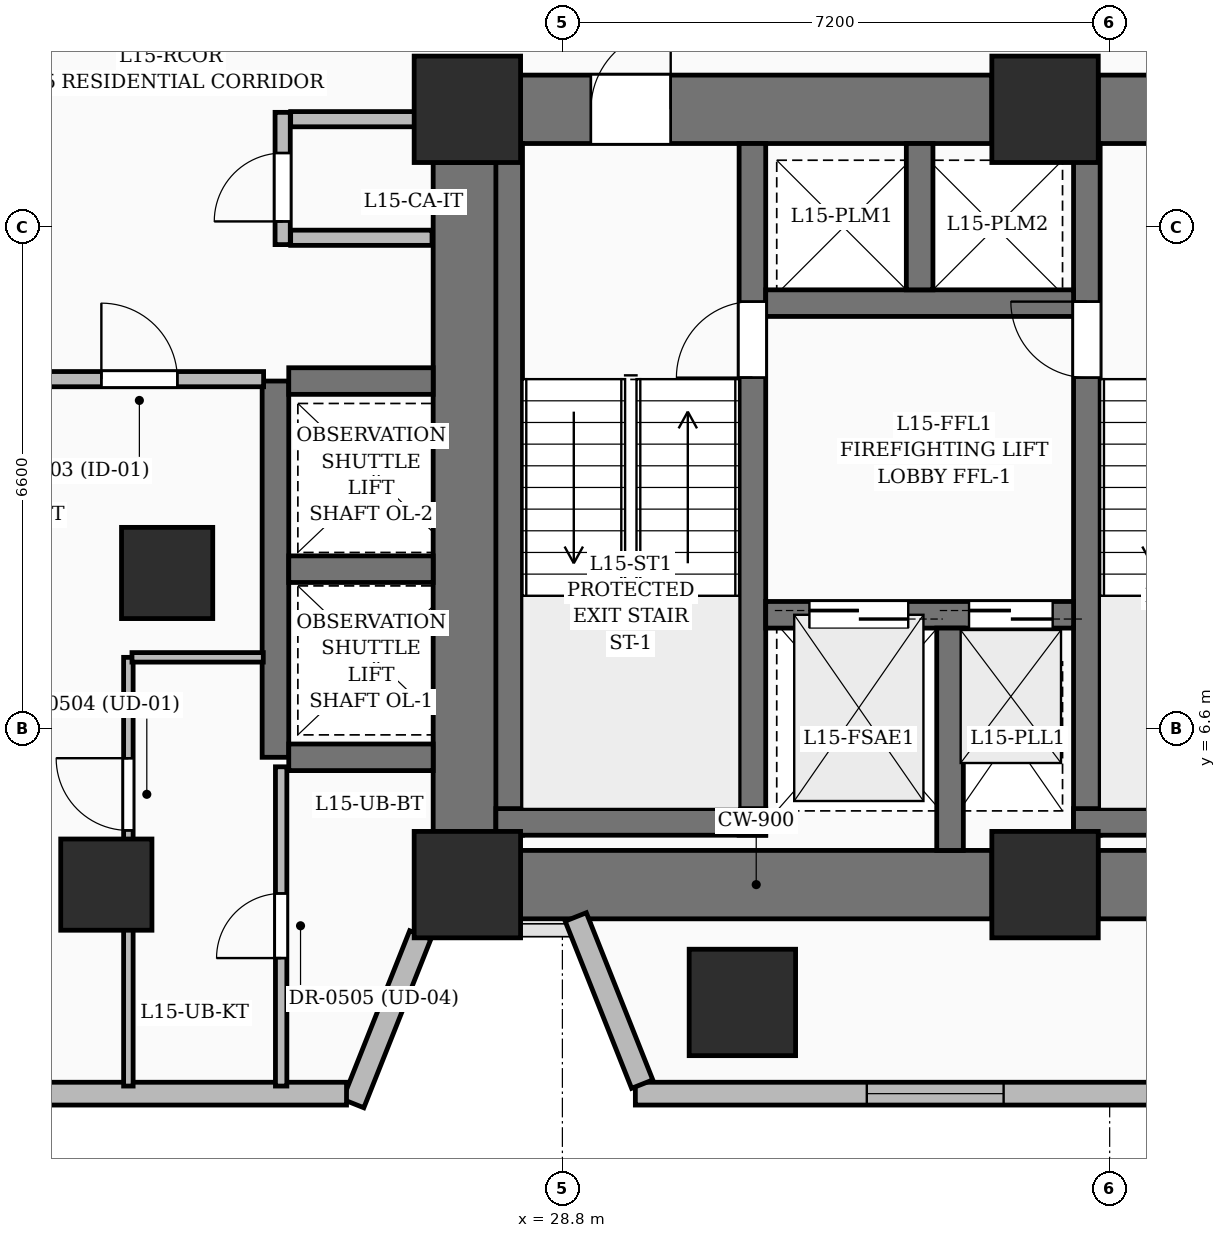
"""IFC4 building model, lengths in metres.
Left out: names, types, materials, properties, quantities, classifications, styles, units other than length and angle.
Written with IfcOpenShell. Run it as: python <this file> out.ifc"""

import sys

from ifc_helpers import new_model, si_unit, direction, frame, frame_2d, origin, origin_2d, place, context, subcontext, project, spatial, rectangle, extrude, element, fill, save


model = new_model("IFC4")
c1 = context("Model", 3, precision=1e-05, world=origin(), true_north=direction((0.0, 1.0)))
c2 = subcontext(c1, "Body", "Model", "MODEL_VIEW")
j1 = project(units=[si_unit("LENGTHUNIT", "METRE"), si_unit("PLANEANGLEUNIT", "RADIAN")], contexts=[c1])
p1 = place(None, origin())
s1 = spatial("IfcSite", under=j1, at=p1, CompositionType="ELEMENT")
p2 = place(p1, origin())
s2 = spatial("IfcBuilding", under=s1, at=p2, CompositionType="ELEMENT")
p3 = place(p2, frame((0.0, 0.0, 64.2)))
s3 = spatial("IfcBuildingStorey", under=s2, at=p3, CompositionType="ELEMENT", Elevation=64.2)
for number, where, z_axis, x_axis in (
    (1, (27.55, 4.55, 0.0), (0.0, 0.0, 1.0), (1.0, 0.0, 0.0)),
    (2, (35.15, 4.55, 0.0), (0.0, 0.0, 1.0), (1.0, 0.0, 0.0)),
    (3, (27.55, 14.75, 0.0), (0.0, 0.0, 1.0), (1.0, 0.0, 0.0)),
    (4, (35.15, 14.75, 0.0), (0.0, 0.0, 1.0), (1.0, 0.0, 0.0)),
):
    element("IfcColumn", number, at=place(p3, frame(where, z_axis=z_axis, x_axis=x_axis)), inside=s3, PredefinedType="COLUMN", context=c2, shape_type="SweptSolid", body=[
        extrude(rectangle(XDim=1.4, YDim=1.4, at=origin_2d()), origin(), (0.0, 0.0, 1.0), 3.6),
    ])
for number, where, z_axis, x_axis in (
    (5, (22.8, 4.55, 0.0), (0.0, 0.0, 1.0), (1.0, 0.0, 0.0)),
    (6, (23.6, 8.65, 0.0), (0.0, 0.0, 1.0), (1.0, 0.0, 0.0)),
):
    element("IfcColumn", number, at=place(p3, frame(where, z_axis=z_axis, x_axis=x_axis)), inside=s3, PredefinedType="COLUMN", context=c2, shape_type="SweptSolid", body=[
        extrude(rectangle(XDim=1.2, YDim=1.2, at=origin_2d()), origin(), (0.0, 0.0, 1.0), 3.6),
    ])
p4 = place(p3, frame((28.25, 4.55, 0.0), z_axis=(0.0, 0.0, 1.0), x_axis=(1.0, 0.0, 0.0)))
e7 = element("IfcWall", 7, at=p4, inside=s3, PredefinedType="SHEAR", context=c2, shape_type="SweptSolid", body=[
    extrude(rectangle(XDim=6.2, YDim=0.9, at=frame_2d((3.1, 0.0))), origin(), (0.0, 0.0, 1.0), 3.6),
])
p5 = place(p3, frame((35.85, 4.55, 0.0), z_axis=(0.0, 0.0, 1.0), x_axis=(1.0, 0.0, 0.0)))
e8 = element("IfcWall", 8, at=p5, inside=s3, PredefinedType="SHEAR", context=c2, shape_type="SweptSolid", body=[
    extrude(rectangle(XDim=10.5, YDim=0.9, at=frame_2d((5.25, 0.0))), origin(), (0.0, 0.0, 1.0), 3.6),
])
p6 = place(p3, frame((28.25, 14.75, 0.0), z_axis=(0.0, 0.0, 1.0), x_axis=(1.0, 0.0, 0.0)))
e9 = element("IfcWall", 9, at=p6, inside=s3, PredefinedType="SHEAR", context=c2, shape_type="SweptSolid", body=[
    extrude(rectangle(XDim=6.2, YDim=0.9, at=frame_2d((3.1, 0.0))), origin(), (0.0, 0.0, 1.0), 3.6),
])
p7 = place(p6, frame((0.925, 0.0, 0.0)))
e10 = element("IfcOpeningElement", 10, at=p7, cuts=e9, PredefinedType="OPENING", context=c2, shape_type="SweptSolid", body=[
    extrude(rectangle(XDim=1.05, YDim=2.15, at=frame_2d((0.525, 1.075))), frame((0.0, 0.46, 0.0), z_axis=(0.0, -1.0, 0.0), x_axis=(1.0, 0.0, 0.0)), (0.0, 0.0, 1.0), 0.92),
])
p8 = place(p3, frame((35.85, 14.75, 0.0), z_axis=(0.0, 0.0, 1.0), x_axis=(1.0, 0.0, 0.0)))
e11 = element("IfcWall", 11, at=p8, inside=s3, PredefinedType="SHEAR", context=c2, shape_type="SweptSolid", body=[
    extrude(rectangle(XDim=10.5, YDim=0.9, at=frame_2d((5.25, 0.0))), origin(), (0.0, 0.0, 1.0), 3.6),
])
p9 = place(p8, frame((0.925, 0.0, 0.0)))
e12 = element("IfcOpeningElement", 12, at=p9, cuts=e11, PredefinedType="OPENING", context=c2, shape_type="SweptSolid", body=[
    extrude(rectangle(XDim=1.05, YDim=2.15, at=frame_2d((0.525, 1.075))), frame((0.0, 0.46, 0.0), z_axis=(0.0, -1.0, 0.0), x_axis=(1.0, 0.0, 0.0)), (0.0, 0.0, 1.0), 0.92),
])
p10 = place(p8, frame((8.525, 0.0, 0.0)))
e13 = element("IfcOpeningElement", 13, at=p10, cuts=e11, PredefinedType="OPENING", context=c2, shape_type="SweptSolid", body=[
    extrude(rectangle(XDim=1.05, YDim=2.15, at=frame_2d((0.525, 1.075))), frame((0.0, 0.46, 0.0), z_axis=(0.0, -1.0, 0.0), x_axis=(1.0, 0.0, 0.0)), (0.0, 0.0, 1.0), 0.92),
])
p11 = place(p3, frame((27.55, 5.25, 0.0), z_axis=(0.0, 0.0, 1.0), x_axis=(0.0, 1.0, 0.0)))
e14 = element("IfcWall", 14, at=p11, inside=s3, PredefinedType="SHEAR", context=c2, shape_type="SweptSolid", body=[
    extrude(rectangle(XDim=8.8, YDim=0.9, at=frame_2d((4.4, 0.0))), origin(), (0.0, 0.0, 1.0), 3.6),
])
p12 = place(p3, frame((28.1, 5.2, 0.0), z_axis=(0.0, 0.0, 1.0), x_axis=(0.0, 1.0, 0.0)))
e15 = element("IfcWall", 15, at=p12, inside=s3, PredefinedType="SOLIDWALL", context=c2, shape_type="SweptSolid", body=[
    extrude(rectangle(XDim=9.1, YDim=0.35, at=frame_2d((4.55, 0.0))), origin(), (0.0, 0.0, 1.0), 3.6),
])
p13 = place(p3, frame((31.3, 5.2, 0.0), z_axis=(0.0, 0.0, 1.0), x_axis=(0.0, 1.0, 0.0)))
e16 = element("IfcWall", 16, at=p13, inside=s3, PredefinedType="SOLIDWALL", context=c2, shape_type="SweptSolid", body=[
    extrude(rectangle(XDim=9.1, YDim=0.35, at=frame_2d((4.55, 0.0))), origin(), (0.0, 0.0, 1.0), 3.6),
])
p14 = place(p13, frame((6.02, 0.0, 0.0)))
e17 = element("IfcOpeningElement", 17, at=p14, cuts=e16, PredefinedType="OPENING", context=c2, shape_type="SweptSolid", body=[
    extrude(rectangle(XDim=1.0, YDim=2.15, at=frame_2d((0.5, 1.075))), frame((0.0, 0.185, 0.0), z_axis=(0.0, -1.0, 0.0), x_axis=(1.0, 0.0, 0.0)), (0.0, 0.0, 1.0), 0.37),
])
p15 = place(p3, frame((27.925, 5.375, 0.0), z_axis=(0.0, 0.0, 1.0), x_axis=(1.0, 0.0, 0.0)))
e18 = element("IfcWall", 18, at=p15, inside=s3, PredefinedType="SOLIDWALL", context=c2, shape_type="SweptSolid", body=[
    extrude(rectangle(XDim=3.55, YDim=0.35, at=frame_2d((1.775, 0.0))), origin(), (0.0, 0.0, 1.0), 3.6),
])
p16 = place(p3, frame((35.7, 5.2, 0.0), z_axis=(0.0, 0.0, 1.0), x_axis=(0.0, 1.0, 0.0)))
e19 = element("IfcWall", 19, at=p16, inside=s3, PredefinedType="SOLIDWALL", context=c2, shape_type="SweptSolid", body=[
    extrude(rectangle(XDim=9.1, YDim=0.35, at=frame_2d((4.55, 0.0))), origin(), (0.0, 0.0, 1.0), 3.6),
])
p17 = place(p16, frame((6.02, 0.0, 0.0)))
e20 = element("IfcOpeningElement", 20, at=p17, cuts=e19, PredefinedType="OPENING", context=c2, shape_type="SweptSolid", body=[
    extrude(rectangle(XDim=1.0, YDim=2.15, at=frame_2d((0.5, 1.075))), frame((0.0, 0.185, 0.0), z_axis=(0.0, -1.0, 0.0), x_axis=(1.0, 0.0, 0.0)), (0.0, 0.0, 1.0), 0.37),
])
p18 = place(p3, frame((35.525, 5.375, 0.0), z_axis=(0.0, 0.0, 1.0), x_axis=(1.0, 0.0, 0.0)))
e21 = element("IfcWall", 21, at=p18, inside=s3, PredefinedType="SOLIDWALL", context=c2, shape_type="SweptSolid", body=[
    extrude(rectangle(XDim=3.55, YDim=0.35, at=frame_2d((1.775, 0.0))), origin(), (0.0, 0.0, 1.0), 3.6),
])
p19 = place(p3, frame((31.475, 8.1, 0.0), z_axis=(0.0, 0.0, 1.0), x_axis=(1.0, 0.0, 0.0)))
e22 = element("IfcWall", 22, at=p19, inside=s3, PredefinedType="SOLIDWALL", context=c2, shape_type="SweptSolid", body=[
    extrude(rectangle(XDim=4.05, YDim=0.35, at=frame_2d((2.025, 0.0))), origin(), (0.0, 0.0, 1.0), 3.6),
])
p20 = place(p19, frame((0.575, 0.0, 0.0)))
e23 = element("IfcOpeningElement", 23, at=p20, cuts=e22, PredefinedType="OPENING", context=c2, shape_type="SweptSolid", body=[
    extrude(rectangle(XDim=1.3, YDim=2.25, at=frame_2d((0.65, 1.125))), frame((0.0, 0.185, 0.0), z_axis=(0.0, -1.0, 0.0), x_axis=(1.0, 0.0, 0.0)), (0.0, 0.0, 1.0), 0.37),
])
p21 = place(p19, frame((2.675, 0.0, 0.0)))
e24 = element("IfcOpeningElement", 24, at=p21, cuts=e22, PredefinedType="OPENING", context=c2, shape_type="SweptSolid", body=[
    extrude(rectangle(XDim=1.1, YDim=2.2, at=frame_2d((0.55, 1.1))), frame((0.0, 0.185, 0.0), z_axis=(0.0, -1.0, 0.0), x_axis=(1.0, 0.0, 0.0)), (0.0, 0.0, 1.0), 0.37),
])
p22 = place(p3, frame((33.9, 5.0, 0.0), z_axis=(0.0, 0.0, 1.0), x_axis=(0.0, 1.0, 0.0)))
e25 = element("IfcWall", 25, at=p22, inside=s3, PredefinedType="SOLIDWALL", context=c2, shape_type="SweptSolid", body=[
    extrude(rectangle(XDim=2.925, YDim=0.35, at=frame_2d((1.462, 0.0))), origin(), (0.0, 0.0, 1.0), 3.6),
])
p23 = place(p3, frame((31.475, 12.2, 0.0), z_axis=(0.0, 0.0, 1.0), x_axis=(1.0, 0.0, 0.0)))
e26 = element("IfcWall", 26, at=p23, inside=s3, PredefinedType="SOLIDWALL", context=c2, shape_type="SweptSolid", body=[
    extrude(rectangle(XDim=4.05, YDim=0.35, at=frame_2d((2.025, 0.0))), origin(), (0.0, 0.0, 1.0), 3.6),
])
p24 = place(p3, frame((33.5, 12.375, 0.0), z_axis=(0.0, 0.0, 1.0), x_axis=(0.0, 1.0, 0.0)))
e27 = element("IfcWall", 27, at=p24, inside=s3, PredefinedType="SOLIDWALL", context=c2, shape_type="SweptSolid", body=[
    extrude(rectangle(XDim=1.925, YDim=0.35, at=frame_2d((0.962, 0.0))), origin(), (0.0, 0.0, 1.0), 3.6),
])
p25 = place(p3, frame((25.025, 6.225, 0.0), z_axis=(0.0, 0.0, 1.0), x_axis=(0.0, 1.0, 0.0)))
e28 = element("IfcWall", 28, at=p25, inside=s3, PredefinedType="SOLIDWALL", context=c2, shape_type="SweptSolid", body=[
    extrude(rectangle(XDim=4.95, YDim=0.35, at=frame_2d((2.475, 0.0))), origin(), (0.0, 0.0, 1.0), 3.6),
])
for number, where, z_axis, x_axis in (
    (29, (25.2, 6.225, 0.0), (0.0, 0.0, 1.0), (1.0, 0.0, 0.0)),
    (30, (25.2, 8.7, 0.0), (0.0, 0.0, 1.0), (1.0, 0.0, 0.0)),
    (31, (25.2, 11.175, 0.0), (0.0, 0.0, 1.0), (1.0, 0.0, 0.0)),
):
    element("IfcWall", number, at=place(p3, frame(where, z_axis=z_axis, x_axis=x_axis)), inside=s3, PredefinedType="SOLIDWALL", context=c2, shape_type="SweptSolid", body=[
        extrude(rectangle(XDim=1.9, YDim=0.35, at=frame_2d((0.95, 0.0))), origin(), (0.0, 0.0, 1.0), 3.6),
    ])
p26 = place(p3, frame((31.168, 3.0, 0.0), z_axis=(0.0, 0.0, 1.0), x_axis=(1.0, 0.0, 0.0)))
e32 = element("IfcColumn", 32, at=p26, inside=s3, PredefinedType="COLUMN", context=c2, shape_type="SweptSolid", body=[
    extrude(rectangle(XDim=1.4, YDim=1.4, at=origin_2d()), origin(), (0.0, 0.0, 1.0), 3.6),
])
p27 = place(p3, frame((37.605, 1.8, 0.0), z_axis=(0.0, 0.0, 1.0), x_axis=(-1.0, 0.0, 0.0)))
e33 = element("IfcWall", 33, at=p27, inside=s3, PredefinedType="SOLIDWALL", context=c2, shape_type="SweptSolid", body=[
    extrude(rectangle(XDim=7.845, YDim=0.3, at=frame_2d((3.922, 0.0))), origin(), (0.0, 0.0, 1.0), 3.35),
])
p28 = place(p27, frame((3.0, 0.0, 0.6)))
e34 = element("IfcOpeningElement", 34, at=p28, cuts=e33, PredefinedType="OPENING", context=c2, shape_type="SweptSolid", body=[
    extrude(rectangle(XDim=1.8, YDim=2.1, at=frame_2d((0.9, 1.05))), frame((0.0, 0.16, 0.0), z_axis=(0.0, -1.0, 0.0), x_axis=(1.0, 0.0, 0.0)), (0.0, 0.0, 1.0), 0.32),
])
p29 = place(p3, frame((29.85, 1.925, 0.0), z_axis=(0.0, 0.0, 1.0), x_axis=(-0.36946923074, 0.92924296475, 0.0)))
e35 = element("IfcWall", 35, at=p29, inside=s3, PredefinedType="SOLIDWALL", context=c2, shape_type="SweptSolid", body=[
    extrude(rectangle(XDim=2.367, YDim=0.3, at=frame_2d((1.184, 0.0))), origin(), (0.0, 0.0, 1.0), 2.375),
])
p30 = place(p3, frame((26.93, 3.888, 0.0), z_axis=(0.0, 0.0, 1.0), x_axis=(-0.369538313764, -0.9292154942, 0.0)))
e36 = element("IfcWall", 36, at=p30, inside=s3, PredefinedType="SOLIDWALL", context=c2, shape_type="SweptSolid", body=[
    extrude(rectangle(XDim=2.387, YDim=0.3, at=frame_2d((1.193, 0.0))), origin(), (0.0, 0.0, 1.0), 2.375),
])
p31 = place(p3, frame((25.96, 1.8, 0.0), z_axis=(0.0, 0.0, 1.0), x_axis=(-1.0, 0.0, 0.0)))
e37 = element("IfcWall", 37, at=p31, inside=s3, PredefinedType="SOLIDWALL", context=c2, shape_type="SweptSolid", body=[
    extrude(rectangle(XDim=7.41, YDim=0.3, at=frame_2d((3.705, 0.0))), origin(), (0.0, 0.0, 1.0), 3.35),
])
p32 = place(p31, frame((4.27, 0.0, 0.8)))
e38 = element("IfcOpeningElement", 38, at=p32, cuts=e37, PredefinedType="OPENING", context=c2, shape_type="SweptSolid", body=[
    extrude(rectangle(XDim=1.2, YDim=1.8, at=frame_2d((0.6, 0.9))), frame((0.0, 0.16, 0.0), z_axis=(0.0, -1.0, 0.0), x_axis=(1.0, 0.0, 0.0)), (0.0, 0.0, 1.0), 0.32),
])
p33 = place(p3, frame((25.12, 12.97, 0.0), z_axis=(0.0, 0.0, 1.0), x_axis=(0.0, 1.0, 0.0)))
e39 = element("IfcWall", 39, at=p33, inside=s3, PredefinedType="PARTITIONING", context=c2, shape_type="SweptSolid", body=[
    extrude(rectangle(XDim=1.74, YDim=0.2, at=frame_2d((0.87, 0.0))), origin(), (0.0, 0.0, 1.0), 3.35),
])
p34 = place(p33, frame((0.305, 0.0, 0.0)))
e40 = element("IfcOpeningElement", 40, at=p34, cuts=e39, PredefinedType="OPENING", context=c2, shape_type="SweptSolid", body=[
    extrude(rectangle(XDim=0.9, YDim=2.1, at=frame_2d((0.45, 1.05))), frame((0.0, 0.11, 0.0), z_axis=(0.0, -1.0, 0.0), x_axis=(1.0, 0.0, 0.0)), (0.0, 0.0, 1.0), 0.22),
])
for number, where, z_axis, x_axis in (
    (41, (25.225, 14.62, 0.0), (0.0, 0.0, 1.0), (1.0, 0.0, 0.0)),
    (42, (25.225, 13.06, 0.0), (0.0, 0.0, 1.0), (1.0, 0.0, 0.0)),
):
    element("IfcWall", number, at=place(p3, frame(where, z_axis=z_axis, x_axis=x_axis)), inside=s3, PredefinedType="PARTITIONING", context=c2, shape_type="SweptSolid", body=[
        extrude(rectangle(XDim=1.86, YDim=0.2, at=frame_2d((0.93, 0.0))), origin(), (0.0, 0.0, 1.0), 3.35),
    ])
p35 = place(p3, frame((21.485, 11.2, 0.0), z_axis=(0.0, 0.0, 1.0), x_axis=(1.0, 0.0, 0.0)))
e43 = element("IfcWall", 43, at=p35, inside=s3, PredefinedType="PARTITIONING", context=c2, shape_type="SweptSolid", body=[
    extrude(rectangle(XDim=3.384, YDim=0.2, at=frame_2d((1.692, 0.0))), origin(), (0.0, 0.0, 1.0), 2.771),
])
p36 = place(p35, frame((1.25, 0.0, 0.0)))
e44 = element("IfcOpeningElement", 44, at=p36, cuts=e43, PredefinedType="OPENING", context=c2, shape_type="SweptSolid", body=[
    extrude(rectangle(XDim=1.0, YDim=2.2, at=frame_2d((0.5, 1.1))), frame((0.0, 0.11, 0.0), z_axis=(0.0, -1.0, 0.0), x_axis=(1.0, 0.0, 0.0)), (0.0, 0.0, 1.0), 0.22),
])
p37 = place(p3, frame((23.09, 1.9, 0.0), z_axis=(0.0, 0.0, 1.0), x_axis=(0.0, 1.0, 0.0)))
e45 = element("IfcWall", 45, at=p37, inside=s3, PredefinedType="PARTITIONING", context=c2, shape_type="SweptSolid", body=[
    extrude(rectangle(XDim=5.64, YDim=0.125, at=frame_2d((2.82, 0.0))), origin(), (0.0, 0.0, 1.0), 2.37),
])
p38 = place(p37, frame((3.363, 0.0, 0.0)))
e46 = element("IfcOpeningElement", 46, at=p38, cuts=e45, PredefinedType="OPENING", context=c2, shape_type="SweptSolid", body=[
    extrude(rectangle(XDim=0.95, YDim=2.2, at=frame_2d((0.475, 1.1))), frame((0.0, 0.072, 0.0), z_axis=(0.0, -1.0, 0.0), x_axis=(1.0, 0.0, 0.0)), (0.0, 0.0, 1.0), 0.145),
])
p39 = place(p3, frame((23.137, 7.54, 0.0), z_axis=(0.0, 0.0, 1.0), x_axis=(1.0, 0.0, 0.0)))
e47 = element("IfcWall", 47, at=p39, inside=s3, PredefinedType="PARTITIONING", context=c2, shape_type="SweptSolid", body=[
    extrude(rectangle(XDim=1.728, YDim=0.125, at=frame_2d((0.864, 0.0))), origin(), (0.0, 0.0, 1.0), 3.35),
])
p40 = place(p3, frame((25.1, 1.9, 0.0), z_axis=(0.0, 0.0, 1.0), x_axis=(0.0, 1.0, 0.0)))
e48 = element("IfcWall", 48, at=p40, inside=s3, PredefinedType="PARTITIONING", context=c2, shape_type="SweptSolid", body=[
    extrude(rectangle(XDim=4.2, YDim=0.15, at=frame_2d((2.1, 0.0))), origin(), (0.0, 0.0, 1.0), 2.309),
])
p41 = place(p40, frame((1.684, 0.0, 0.0)))
e49 = element("IfcOpeningElement", 49, at=p41, cuts=e48, PredefinedType="OPENING", context=c2, shape_type="SweptSolid", body=[
    extrude(rectangle(XDim=0.85, YDim=2.1, at=frame_2d((0.425, 1.05))), frame((0.0, 0.085, 0.0), z_axis=(0.0, -1.0, 0.0), x_axis=(1.0, 0.0, 0.0)), (0.0, 0.0, 1.0), 0.17),
])
p42 = place(p28, origin())
e50 = element("IfcWindow", 50, at=p42, inside=s3, PartitioningType="SINGLE_PANEL", PredefinedType="WINDOW", context=c2, shape_type="SweptSolid", body=[
    extrude(rectangle(XDim=1.8, YDim=2.1, at=frame_2d((0.9, 1.05))), frame((0.0, 0.03, 0.0), z_axis=(0.0, -1.0, 0.0), x_axis=(1.0, 0.0, 0.0)), (0.0, 0.0, 1.0), 0.06),
])
fill(e34, e50)
p43 = place(p7, origin())
e51 = element("IfcDoor", 51, at=p43, inside=s3, OperationType="SINGLE_SWING_RIGHT", PredefinedType="DOOR", context=c2, shape_type="SweptSolid", body=[
    extrude(rectangle(XDim=1.05, YDim=2.15, at=frame_2d((0.525, 1.075))), frame((0.0, 0.025, 0.0), z_axis=(0.0, -1.0, 0.0), x_axis=(1.0, 0.0, 0.0)), (0.0, 0.0, 1.0), 0.05),
])
fill(e10, e51)
p44 = place(p14, origin())
e52 = element("IfcDoor", 52, at=p44, inside=s3, OperationType="SINGLE_SWING_LEFT", PredefinedType="DOOR", context=c2, shape_type="SweptSolid", body=[
    extrude(rectangle(XDim=1.0, YDim=2.15, at=frame_2d((0.5, 1.075))), frame((0.0, 0.025, 0.0), z_axis=(0.0, -1.0, 0.0), x_axis=(1.0, 0.0, 0.0)), (0.0, 0.0, 1.0), 0.05),
])
fill(e17, e52)
p45 = place(p17, origin())
e53 = element("IfcDoor", 53, at=p45, inside=s3, OperationType="SINGLE_SWING_RIGHT", PredefinedType="DOOR", context=c2, shape_type="SweptSolid", body=[
    extrude(rectangle(XDim=1.0, YDim=2.15, at=frame_2d((0.5, 1.075))), frame((0.0, 0.025, 0.0), z_axis=(0.0, -1.0, 0.0), x_axis=(1.0, 0.0, 0.0)), (0.0, 0.0, 1.0), 0.05),
])
fill(e20, e53)
p46 = place(p20, origin())
e54 = element("IfcDoor", 54, at=p46, inside=s3, OperationType="DOUBLE_DOOR_SLIDING", PredefinedType="DOOR", context=c2, shape_type="SweptSolid", body=[
    extrude(rectangle(XDim=1.3, YDim=2.25, at=frame_2d((0.65, 1.125))), frame((0.0, 0.025, 0.0), z_axis=(0.0, -1.0, 0.0), x_axis=(1.0, 0.0, 0.0)), (0.0, 0.0, 1.0), 0.05),
])
fill(e23, e54)
p47 = place(p21, origin())
e55 = element("IfcDoor", 55, at=p47, inside=s3, OperationType="DOUBLE_DOOR_SLIDING", PredefinedType="DOOR", context=c2, shape_type="SweptSolid", body=[
    extrude(rectangle(XDim=1.1, YDim=2.2, at=frame_2d((0.55, 1.1))), frame((0.0, 0.025, 0.0), z_axis=(0.0, -1.0, 0.0), x_axis=(1.0, 0.0, 0.0)), (0.0, 0.0, 1.0), 0.05),
])
fill(e24, e55)
p48 = place(p34, origin())
e56 = element("IfcDoor", 56, at=p48, inside=s3, OperationType="SINGLE_SWING_LEFT", PredefinedType="DOOR", context=c2, shape_type="SweptSolid", body=[
    extrude(rectangle(XDim=0.9, YDim=2.1, at=frame_2d((0.45, 1.05))), frame((0.0, 0.025, 0.0), z_axis=(0.0, -1.0, 0.0), x_axis=(1.0, 0.0, 0.0)), (0.0, 0.0, 1.0), 0.05),
])
fill(e40, e56)
p49 = place(p36, origin())
e57 = element("IfcDoor", 57, at=p49, inside=s3, OperationType="SINGLE_SWING_LEFT", PredefinedType="DOOR", context=c2, shape_type="SweptSolid", body=[
    extrude(rectangle(XDim=1.0, YDim=2.2, at=frame_2d((0.5, 1.1))), frame((0.0, 0.025, 0.0), z_axis=(0.0, -1.0, 0.0), x_axis=(1.0, 0.0, 0.0)), (0.0, 0.0, 1.0), 0.05),
])
fill(e44, e57)
p50 = place(p38, origin())
e58 = element("IfcDoor", 58, at=p50, inside=s3, OperationType="SINGLE_SWING_RIGHT", PredefinedType="DOOR", context=c2, shape_type="SweptSolid", body=[
    extrude(rectangle(XDim=0.95, YDim=2.2, at=frame_2d((0.475, 1.1))), frame((0.0, 0.025, 0.0), z_axis=(0.0, -1.0, 0.0), x_axis=(1.0, 0.0, 0.0)), (0.0, 0.0, 1.0), 0.05),
])
fill(e46, e58)
p51 = place(p41, origin())
e59 = element("IfcDoor", 59, at=p51, inside=s3, OperationType="SINGLE_SWING_LEFT", PredefinedType="DOOR", context=c2, shape_type="SweptSolid", body=[
    extrude(rectangle(XDim=0.85, YDim=2.1, at=frame_2d((0.425, 1.05))), frame((0.0, 0.025, 0.0), z_axis=(0.0, -1.0, 0.0), x_axis=(1.0, 0.0, 0.0)), (0.0, 0.0, 1.0), 0.05),
])
fill(e49, e59)
save(model, sys.argv[1])
